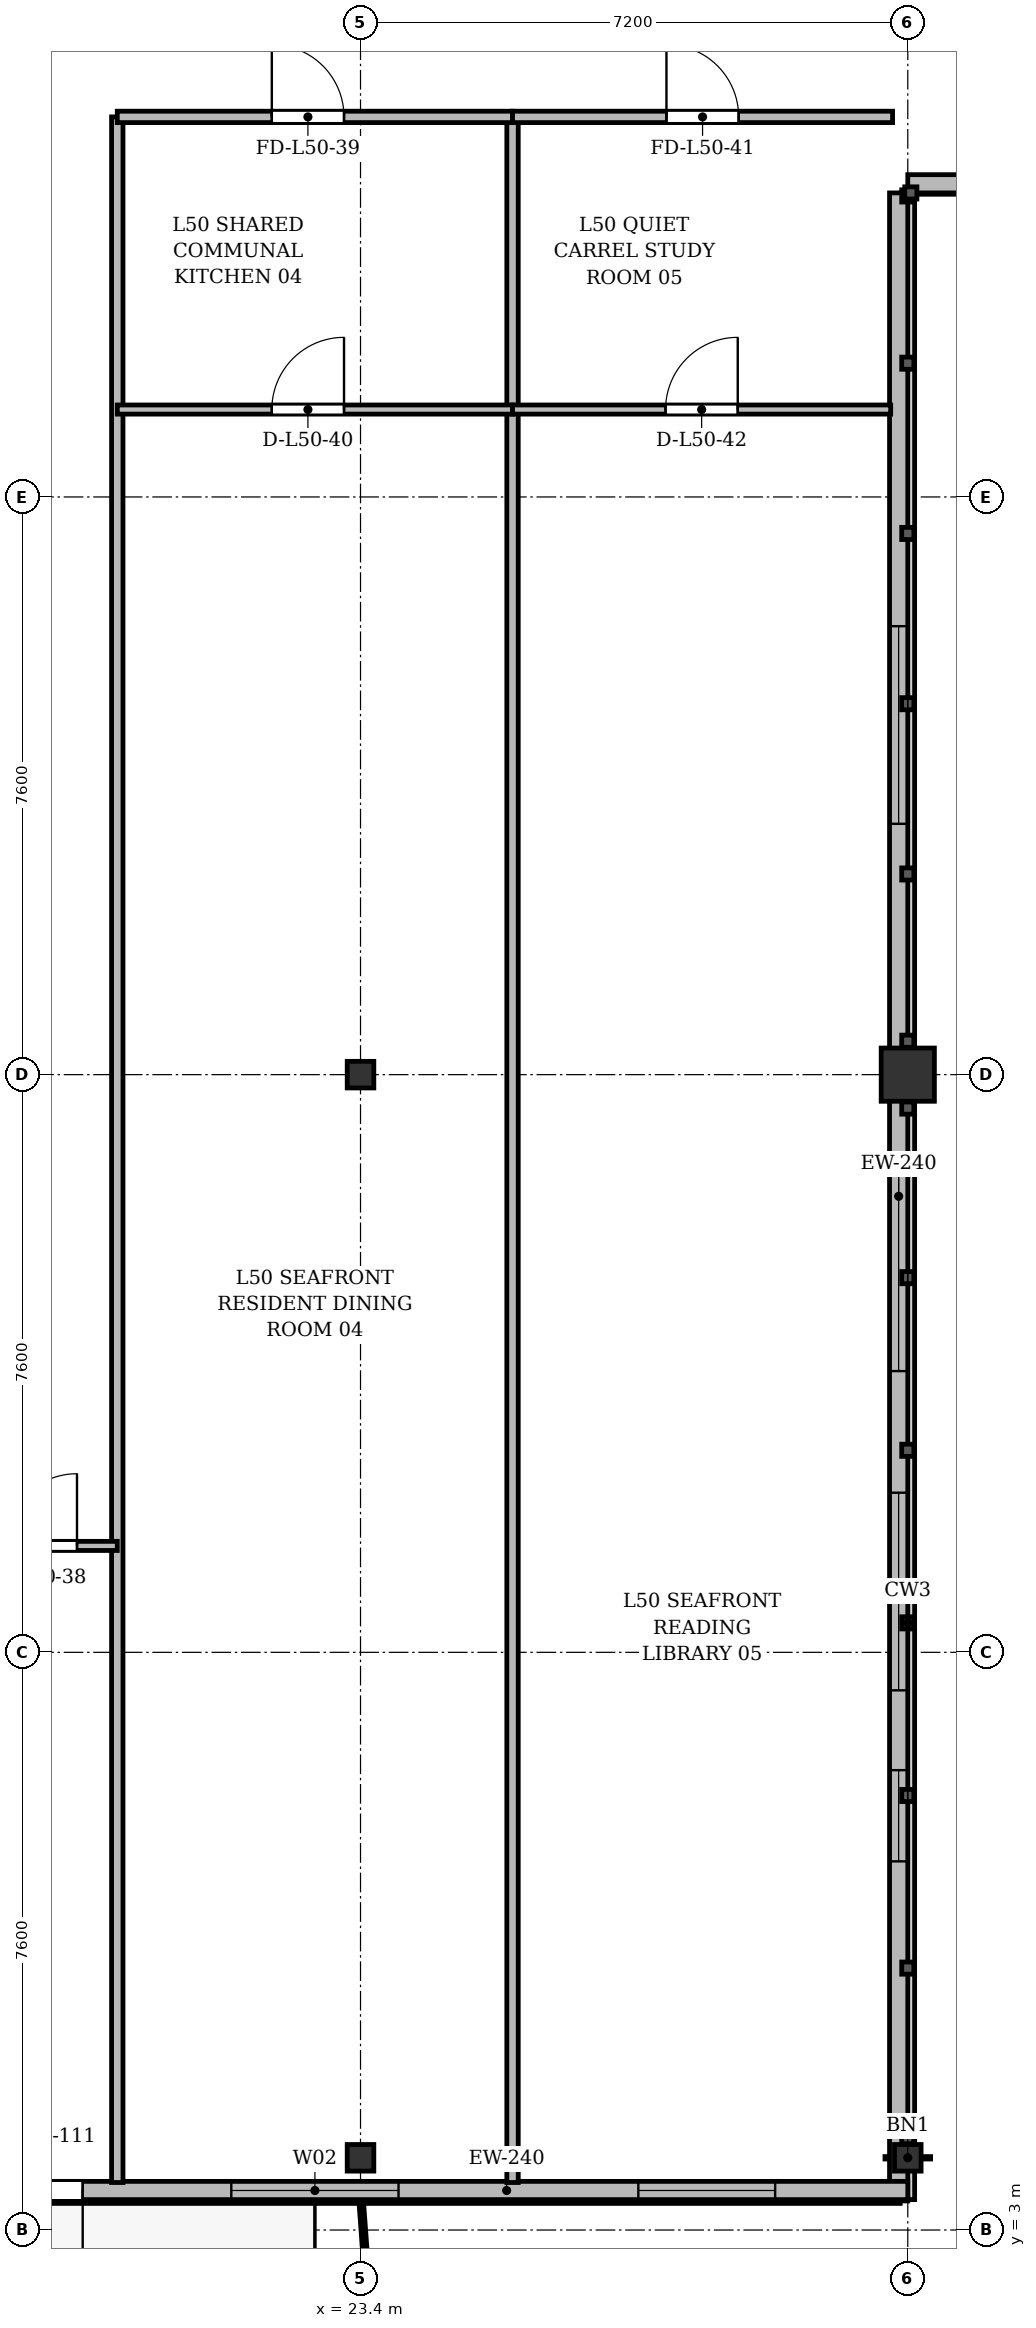
"""IFC4 building model, lengths in metres.
Left out: names, types, materials, properties, quantities, classifications, styles, units other than length and angle.
Written with IfcOpenShell. Run it as: python <this file> out.ifc"""

import sys

from ifc_helpers import new_model, si_unit, direction, frame, frame_2d, origin, origin_2d, place, context, subcontext, project, spatial, rectangle, i_section, extrude, source, transform, mapped, element, fill, save


model = new_model("IFC4")
c1 = context("Model", 3, precision=1e-05, world=origin(), true_north=direction((0.0, 1.0)))
c2 = subcontext(c1, "Body", "Model", "MODEL_VIEW")
j1 = project(units=[si_unit("LENGTHUNIT", "METRE"), si_unit("PLANEANGLEUNIT", "RADIAN")], contexts=[c1])
p1 = place(None, origin())
s1 = spatial("IfcSite", under=j1, at=p1, CompositionType="ELEMENT")
p2 = place(p1, origin())
s2 = spatial("IfcBuilding", under=s1, at=p2, CompositionType="ELEMENT")
p3 = place(p2, frame((0.0, 0.0, 194.1)))
s3 = spatial("IfcBuildingStorey", under=s2, at=p3, CompositionType="ELEMENT", Elevation=194.1)
m1 = source(origin(), c2, "Body", "SweptSolid", [
    extrude(i_section(OverallWidth=0.35, OverallDepth=0.35, WebThickness=0.018, FlangeThickness=0.028, at=origin_2d()), origin(), (0.0, 0.0, 1.0), 3.6),
])
for number, where, z_axis, x_axis in (
    (1, (23.4, 3.95, 0.0), (0.0, 0.0, 1.0), (1.0, 0.0, 0.0)),
    (2, (23.4, 18.2, 0.0), (0.0, 0.0, 1.0), (1.0, 0.0, 0.0)),
    (3, (30.6, 3.95, 0.0), (0.0, 0.0, 1.0), (1.0, 0.0, 0.0)),
):
    element("IfcColumn", number, at=place(p3, frame(where, z_axis=z_axis, x_axis=x_axis)), inside=s3, PredefinedType="COLUMN", context=c2, shape_type="MappedRepresentation", body=[
        mapped(m1, transform((0.0, 0.0, 0.0), x_axis=(1.0, 0.0, 0.0), y_axis=(0.0, 1.0, 0.0), z_axis=(0.0, 0.0, 1.0), scale=1.0)),
    ])
m2 = source(origin(), c2, "Body", "SweptSolid", [
    extrude(rectangle(XDim=0.7, YDim=0.7, at=origin_2d()), origin(), (0.0, 0.0, 1.0), 3.6),
])
p4 = place(p3, frame((30.6, 18.2, 0.0), z_axis=(0.0, 0.0, 1.0), x_axis=(1.0, 0.0, 0.0)))
e4 = element("IfcColumn", 4, at=p4, inside=s3, PredefinedType="COLUMN", context=c2, shape_type="MappedRepresentation", body=[
    mapped(m2, transform((0.0, 0.0, 0.0), x_axis=(1.0, 0.0, 0.0), y_axis=(0.0, 1.0, 0.0), z_axis=(0.0, 0.0, 1.0), scale=1.0)),
])
p5 = place(p3, frame((43.8, 29.92, 0.0), z_axis=(0.0, 0.0, 1.0), x_axis=(-1.0, 0.0, 0.0)))
e5 = element("IfcWall", 5, at=p5, inside=s3, PredefinedType="SOLIDWALL", context=c2, shape_type="SweptSolid", body=[
    extrude(rectangle(XDim=13.2, YDim=0.24, at=frame_2d((6.6, 0.0))), origin(), (0.0, 0.0, 1.0), 2.86),
])
p6 = place(p5, frame((5.7, 0.0, 0.9)))
e6 = element("IfcOpeningElement", 6, at=p6, cuts=e5, PredefinedType="OPENING", context=c2, shape_type="SweptSolid", body=[
    extrude(rectangle(XDim=1.8, YDim=1.8, at=frame_2d((0.9, 0.9))), frame((0.0, 0.13, 0.0), z_axis=(0.0, -1.0, 0.0), x_axis=(1.0, 0.0, 0.0)), (0.0, 0.0, 1.0), 0.26),
])
p7 = place(p3, frame((30.48, 29.8, 0.0), z_axis=(0.0, 0.0, 1.0), x_axis=(0.0, -1.0, 0.0)))
e7 = element("IfcWall", 7, at=p7, inside=s3, PredefinedType="SOLIDWALL", context=c2, shape_type="SweptSolid", body=[
    extrude(rectangle(XDim=26.4, YDim=0.24, at=frame_2d((13.2, 0.0))), origin(), (0.0, 0.0, 1.0), 2.86),
])
p8 = place(p7, frame((20.75, 0.0, 0.92)))
e8 = element("IfcOpeningElement", 8, at=p8, cuts=e7, PredefinedType="OPENING", context=c2, shape_type="SweptSolid", body=[
    extrude(rectangle(XDim=1.2, YDim=1.65, at=frame_2d((0.6, 0.825))), frame((0.0, 0.13, 0.0), z_axis=(0.0, -1.0, 0.0), x_axis=(1.0, 0.0, 0.0)), (0.0, 0.0, 1.0), 0.26),
])
p9 = place(p7, frame((17.1, 0.0, 0.92)))
e9 = element("IfcOpeningElement", 9, at=p9, cuts=e7, PredefinedType="OPENING", context=c2, shape_type="SweptSolid", body=[
    extrude(rectangle(XDim=2.6, YDim=1.84, at=frame_2d((1.3, 0.92))), frame((0.0, 0.13, 0.0), z_axis=(0.0, -1.0, 0.0), x_axis=(1.0, 0.0, 0.0)), (0.0, 0.0, 1.0), 0.26),
])
p10 = place(p7, frame((12.9, 0.0, 0.92)))
e10 = element("IfcOpeningElement", 10, at=p10, cuts=e7, PredefinedType="OPENING", context=c2, shape_type="SweptSolid", body=[
    extrude(rectangle(XDim=2.6, YDim=1.84, at=frame_2d((1.3, 0.92))), frame((0.0, 0.13, 0.0), z_axis=(0.0, -1.0, 0.0), x_axis=(1.0, 0.0, 0.0)), (0.0, 0.0, 1.0), 0.26),
])
p11 = place(p7, frame((5.7, 0.0, 0.92)))
e11 = element("IfcOpeningElement", 11, at=p11, cuts=e7, PredefinedType="OPENING", context=c2, shape_type="SweptSolid", body=[
    extrude(rectangle(XDim=2.6, YDim=1.84, at=frame_2d((1.3, 0.92))), frame((0.0, 0.13, 0.0), z_axis=(0.0, -1.0, 0.0), x_axis=(1.0, 0.0, 0.0)), (0.0, 0.0, 1.0), 0.26),
])
p12 = place(p3, frame((30.6, 3.52, 0.0), z_axis=(0.0, 0.0, 1.0), x_axis=(-1.0, 0.0, 0.0)))
e12 = element("IfcWall", 12, at=p12, inside=s3, PredefinedType="SOLIDWALL", context=c2, shape_type="SweptSolid", body=[
    extrude(rectangle(XDim=19.6, YDim=0.24, at=frame_2d((9.8, 0.0))), origin(), (0.0, 0.0, 1.0), 3.36),
])
p13 = place(p12, frame((1.745, 0.0, 0.9)))
e13 = element("IfcOpeningElement", 13, at=p13, cuts=e12, PredefinedType="OPENING", context=c2, shape_type="SweptSolid", body=[
    extrude(rectangle(XDim=1.8, YDim=1.8, at=frame_2d((0.9, 0.9))), frame((0.0, 0.13, 0.0), z_axis=(0.0, -1.0, 0.0), x_axis=(1.0, 0.0, 0.0)), (0.0, 0.0, 1.0), 0.26),
])
p14 = place(p12, frame((6.7, 0.0, 0.9)))
e14 = element("IfcOpeningElement", 14, at=p14, cuts=e12, PredefinedType="OPENING", context=c2, shape_type="SweptSolid", body=[
    extrude(rectangle(XDim=2.2, YDim=1.8, at=frame_2d((1.1, 0.9))), frame((0.0, 0.13, 0.0), z_axis=(0.0, -1.0, 0.0), x_axis=(1.0, 0.0, 0.0)), (0.0, 0.0, 1.0), 0.26),
])
p15 = place(p12, frame((10.855, 0.0, 0.0)))
e15 = element("IfcOpeningElement", 15, at=p15, cuts=e12, PredefinedType="OPENING", context=c2, shape_type="SweptSolid", body=[
    extrude(rectangle(XDim=1.2, YDim=2.2, at=frame_2d((0.6, 1.1))), frame((0.0, 0.13, 0.0), z_axis=(0.0, -1.0, 0.0), x_axis=(1.0, 0.0, 0.0)), (0.0, 0.0, 1.0), 0.26),
])
p16 = place(p12, frame((12.85, 0.0, 0.9)))
e16 = element("IfcOpeningElement", 16, at=p16, cuts=e12, PredefinedType="OPENING", context=c2, shape_type="SweptSolid", body=[
    extrude(rectangle(XDim=1.5, YDim=1.75, at=frame_2d((0.75, 0.875))), frame((0.0, 0.13, 0.0), z_axis=(0.0, -1.0, 0.0), x_axis=(1.0, 0.0, 0.0)), (0.0, 0.0, 1.0), 0.26),
])
p17 = place(p12, frame((15.175, 0.0, 0.9)))
e17 = element("IfcOpeningElement", 17, at=p17, cuts=e12, PredefinedType="OPENING", context=c2, shape_type="SweptSolid", body=[
    extrude(rectangle(XDim=1.65, YDim=1.85, at=frame_2d((0.825, 0.925))), frame((0.0, 0.13, 0.0), z_axis=(0.0, -1.0, 0.0), x_axis=(1.0, 0.0, 0.0)), (0.0, 0.0, 1.0), 0.26),
])
p18 = place(p12, frame((17.455, 0.0, 0.9)))
e18 = element("IfcOpeningElement", 18, at=p18, cuts=e12, PredefinedType="OPENING", context=c2, shape_type="SweptSolid", body=[
    extrude(rectangle(XDim=1.8, YDim=1.8, at=frame_2d((0.9, 0.9))), frame((0.0, 0.13, 0.0), z_axis=(0.0, -1.0, 0.0), x_axis=(1.0, 0.0, 0.0)), (0.0, 0.0, 1.0), 0.26),
])
for number, where, z_axis, x_axis in (
    (19, (25.4, 3.625, 0.0), (0.0, 0.0, 1.0), (0.0, 1.0, 0.0)),
    (20, (20.2, 3.625, 0.0), (0.0, 0.0, 1.0), (0.0, 1.0, 0.0)),
):
    element("IfcWall", number, at=place(p3, frame(where, z_axis=z_axis, x_axis=x_axis)), inside=s3, PredefinedType="PARTITIONING", context=c2, shape_type="SweptSolid", body=[
        extrude(rectangle(XDim=27.175, YDim=0.15, at=frame_2d((13.587, 0.0))), origin(), (0.0, 0.0, 1.0), 2.91),
    ])
p19 = place(p3, frame((18.2, 12.0, 0.0), z_axis=(0.0, 0.0, 1.0), x_axis=(1.0, 0.0, 0.0)))
e21 = element("IfcWall", 21, at=p19, inside=s3, PredefinedType="PARTITIONING", context=c2, shape_type="SweptSolid", body=[
    extrude(rectangle(XDim=2.0, YDim=0.12, at=frame_2d((1.0, 0.0))), origin(), (0.0, 0.0, 1.0), 3.36),
])
p20 = place(p19, frame((0.52, 0.0, 0.0)))
e22 = element("IfcOpeningElement", 22, at=p20, cuts=e21, PredefinedType="OPENING", context=c2, shape_type="SweptSolid", body=[
    extrude(rectangle(XDim=0.95, YDim=2.15, at=frame_2d((0.475, 1.075))), frame((0.0, 0.07, 0.0), z_axis=(0.0, -1.0, 0.0), x_axis=(1.0, 0.0, 0.0)), (0.0, 0.0, 1.0), 0.14),
])
p21 = place(p3, frame((20.2, 30.8, 0.0), z_axis=(0.0, 0.0, 1.0), x_axis=(1.0, 0.0, 0.0)))
e23 = element("IfcWall", 23, at=p21, inside=s3, PredefinedType="PARTITIONING", context=c2, shape_type="SweptSolid", body=[
    extrude(rectangle(XDim=5.2, YDim=0.15, at=frame_2d((2.6, 0.0))), origin(), (0.0, 0.0, 1.0), 2.86),
])
p22 = place(p21, frame((2.033, 0.0, 0.0)))
e24 = element("IfcOpeningElement", 24, at=p22, cuts=e23, PredefinedType="OPENING", context=c2, shape_type="SweptSolid", body=[
    extrude(rectangle(XDim=0.95, YDim=2.15, at=frame_2d((0.475, 1.075))), frame((0.0, 0.085, 0.0), z_axis=(0.0, -1.0, 0.0), x_axis=(1.0, 0.0, 0.0)), (0.0, 0.0, 1.0), 0.17),
])
p23 = place(p3, frame((20.2, 26.95, 0.0), z_axis=(0.0, 0.0, 1.0), x_axis=(1.0, 0.0, 0.0)))
e25 = element("IfcWall", 25, at=p23, inside=s3, PredefinedType="PARTITIONING", context=c2, shape_type="SweptSolid", body=[
    extrude(rectangle(XDim=5.2, YDim=0.12, at=frame_2d((2.6, 0.0))), origin(), (0.0, 0.0, 1.0), 2.86),
])
p24 = place(p23, frame((2.033, 0.0, 0.0)))
e26 = element("IfcOpeningElement", 26, at=p24, cuts=e25, PredefinedType="OPENING", context=c2, shape_type="SweptSolid", body=[
    extrude(rectangle(XDim=0.95, YDim=2.15, at=frame_2d((0.475, 1.075))), frame((0.0, 0.07, 0.0), z_axis=(0.0, -1.0, 0.0), x_axis=(1.0, 0.0, 0.0)), (0.0, 0.0, 1.0), 0.14),
])
p25 = place(p3, frame((25.4, 30.8, 0.0), z_axis=(0.0, 0.0, 1.0), x_axis=(1.0, 0.0, 0.0)))
e27 = element("IfcWall", 27, at=p25, inside=s3, PredefinedType="PARTITIONING", context=c2, shape_type="SweptSolid", body=[
    extrude(rectangle(XDim=5.0, YDim=0.15, at=frame_2d((2.5, 0.0))), origin(), (0.0, 0.0, 1.0), 3.36),
])
p26 = place(p25, frame((2.025, 0.0, 0.0)))
e28 = element("IfcOpeningElement", 28, at=p26, cuts=e27, PredefinedType="OPENING", context=c2, shape_type="SweptSolid", body=[
    extrude(rectangle(XDim=0.95, YDim=2.15, at=frame_2d((0.475, 1.075))), frame((0.0, 0.085, 0.0), z_axis=(0.0, -1.0, 0.0), x_axis=(1.0, 0.0, 0.0)), (0.0, 0.0, 1.0), 0.17),
])
p27 = place(p3, frame((25.4, 26.95, 0.0), z_axis=(0.0, 0.0, 1.0), x_axis=(1.0, 0.0, 0.0)))
e29 = element("IfcWall", 29, at=p27, inside=s3, PredefinedType="PARTITIONING", context=c2, shape_type="SweptSolid", body=[
    extrude(rectangle(XDim=4.975, YDim=0.12, at=frame_2d((2.488, 0.0))), origin(), (0.0, 0.0, 1.0), 3.36),
])
p28 = place(p27, frame((2.013, 0.0, 0.0)))
e30 = element("IfcOpeningElement", 30, at=p28, cuts=e29, PredefinedType="OPENING", context=c2, shape_type="SweptSolid", body=[
    extrude(rectangle(XDim=0.95, YDim=2.15, at=frame_2d((0.475, 1.075))), frame((0.0, 0.07, 0.0), z_axis=(0.0, -1.0, 0.0), x_axis=(1.0, 0.0, 0.0)), (0.0, 0.0, 1.0), 0.14),
])
m3 = source(origin(), c2, "Body", "SweptSolid", [
    extrude(rectangle(XDim=1.2, YDim=1.65, at=frame_2d((0.6, 0.825))), frame((0.0, 0.03, 0.0), z_axis=(0.0, -1.0, 0.0), x_axis=(1.0, 0.0, 0.0)), (0.0, 0.0, 1.0), 0.06),
])
p29 = place(p8, origin())
e31 = element("IfcWindow", 31, at=p29, inside=s3, PartitioningType="SINGLE_PANEL", PredefinedType="WINDOW", context=c2, shape_type="MappedRepresentation", body=[
    mapped(m3, transform((0.0, 0.0, 0.0), x_axis=(1.0, 0.0, 0.0), y_axis=(0.0, 1.0, 0.0), z_axis=(0.0, 0.0, 1.0), scale=1.0)),
])
fill(e8, e31)
m4 = source(origin(), c2, "Body", "SweptSolid", [
    extrude(rectangle(XDim=2.6, YDim=1.84, at=frame_2d((1.3, 0.92))), frame((0.0, 0.03, 0.0), z_axis=(0.0, -1.0, 0.0), x_axis=(1.0, 0.0, 0.0)), (0.0, 0.0, 1.0), 0.06),
])
p30 = place(p9, origin())
e32 = element("IfcWindow", 32, at=p30, inside=s3, PartitioningType="SINGLE_PANEL", PredefinedType="WINDOW", context=c2, shape_type="MappedRepresentation", body=[
    mapped(m4, transform((0.0, 0.0, 0.0), x_axis=(1.0, 0.0, 0.0), y_axis=(0.0, 1.0, 0.0), z_axis=(0.0, 0.0, 1.0), scale=1.0)),
])
fill(e9, e32)
p31 = place(p10, origin())
e33 = element("IfcWindow", 33, at=p31, inside=s3, PartitioningType="SINGLE_PANEL", PredefinedType="WINDOW", context=c2, shape_type="MappedRepresentation", body=[
    mapped(m4, transform((0.0, 0.0, 0.0), x_axis=(1.0, 0.0, 0.0), y_axis=(0.0, 1.0, 0.0), z_axis=(0.0, 0.0, 1.0), scale=1.0)),
])
fill(e10, e33)
p32 = place(p11, origin())
e34 = element("IfcWindow", 34, at=p32, inside=s3, PartitioningType="SINGLE_PANEL", PredefinedType="WINDOW", context=c2, shape_type="MappedRepresentation", body=[
    mapped(m4, transform((0.0, 0.0, 0.0), x_axis=(1.0, 0.0, 0.0), y_axis=(0.0, 1.0, 0.0), z_axis=(0.0, 0.0, 1.0), scale=1.0)),
])
fill(e11, e34)
m5 = source(origin(), c2, "Body", "SweptSolid", [
    extrude(rectangle(XDim=1.8, YDim=1.8, at=frame_2d((0.9, 0.9))), frame((0.0, 0.03, 0.0), z_axis=(0.0, -1.0, 0.0), x_axis=(1.0, 0.0, 0.0)), (0.0, 0.0, 1.0), 0.06),
])
p33 = place(p13, origin())
e35 = element("IfcWindow", 35, at=p33, inside=s3, PartitioningType="SINGLE_PANEL", PredefinedType="WINDOW", context=c2, shape_type="MappedRepresentation", body=[
    mapped(m5, transform((0.0, 0.0, 0.0), x_axis=(1.0, 0.0, 0.0), y_axis=(0.0, 1.0, 0.0), z_axis=(0.0, 0.0, 1.0), scale=1.0)),
])
fill(e13, e35)
m6 = source(origin(), c2, "Body", "SweptSolid", [
    extrude(rectangle(XDim=2.2, YDim=1.8, at=frame_2d((1.1, 0.9))), frame((0.0, 0.03, 0.0), z_axis=(0.0, -1.0, 0.0), x_axis=(1.0, 0.0, 0.0)), (0.0, 0.0, 1.0), 0.06),
])
p34 = place(p14, origin())
e36 = element("IfcWindow", 36, at=p34, inside=s3, PartitioningType="SINGLE_PANEL", PredefinedType="WINDOW", context=c2, shape_type="MappedRepresentation", body=[
    mapped(m6, transform((0.0, 0.0, 0.0), x_axis=(1.0, 0.0, 0.0), y_axis=(0.0, 1.0, 0.0), z_axis=(0.0, 0.0, 1.0), scale=1.0)),
])
fill(e14, e36)
m7 = source(origin(), c2, "Body", "SweptSolid", [
    extrude(rectangle(XDim=1.2, YDim=2.2, at=frame_2d((0.6, 1.1))), frame((0.0, 0.025, 0.0), z_axis=(0.0, -1.0, 0.0), x_axis=(1.0, 0.0, 0.0)), (0.0, 0.0, 1.0), 0.05),
])
p35 = place(p15, origin())
e37 = element("IfcDoor", 37, at=p35, inside=s3, OperationType="SINGLE_SWING_LEFT", PredefinedType="DOOR", context=c2, shape_type="MappedRepresentation", body=[
    mapped(m7, transform((0.0, 0.0, 0.0), x_axis=(1.0, 0.0, 0.0), y_axis=(0.0, 1.0, 0.0), z_axis=(0.0, 0.0, 1.0), scale=1.0)),
])
fill(e15, e37)
m8 = source(origin(), c2, "Body", "SweptSolid", [
    extrude(rectangle(XDim=0.95, YDim=2.15, at=frame_2d((0.475, 1.075))), frame((0.0, 0.025, 0.0), z_axis=(0.0, -1.0, 0.0), x_axis=(1.0, 0.0, 0.0)), (0.0, 0.0, 1.0), 0.05),
])
p36 = place(p20, origin())
e38 = element("IfcDoor", 38, at=p36, inside=s3, OperationType="SINGLE_SWING_RIGHT", PredefinedType="DOOR", context=c2, shape_type="MappedRepresentation", body=[
    mapped(m8, transform((0.0, 0.0, 0.0), x_axis=(1.0, 0.0, 0.0), y_axis=(0.0, 1.0, 0.0), z_axis=(0.0, 0.0, 1.0), scale=1.0)),
])
fill(e22, e38)
p37 = place(p22, origin())
e39 = element("IfcDoor", 39, at=p37, inside=s3, OperationType="SINGLE_SWING_LEFT", PredefinedType="DOOR", context=c2, shape_type="MappedRepresentation", body=[
    mapped(m8, transform((0.0, 0.0, 0.0), x_axis=(1.0, 0.0, 0.0), y_axis=(0.0, 1.0, 0.0), z_axis=(0.0, 0.0, 1.0), scale=1.0)),
])
fill(e24, e39)
p38 = place(p24, origin())
e40 = element("IfcDoor", 40, at=p38, inside=s3, OperationType="SINGLE_SWING_RIGHT", PredefinedType="DOOR", context=c2, shape_type="MappedRepresentation", body=[
    mapped(m8, transform((0.0, 0.0, 0.0), x_axis=(1.0, 0.0, 0.0), y_axis=(0.0, 1.0, 0.0), z_axis=(0.0, 0.0, 1.0), scale=1.0)),
])
fill(e26, e40)
p39 = place(p26, origin())
e41 = element("IfcDoor", 41, at=p39, inside=s3, OperationType="SINGLE_SWING_LEFT", PredefinedType="DOOR", context=c2, shape_type="MappedRepresentation", body=[
    mapped(m8, transform((0.0, 0.0, 0.0), x_axis=(1.0, 0.0, 0.0), y_axis=(0.0, 1.0, 0.0), z_axis=(0.0, 0.0, 1.0), scale=1.0)),
])
fill(e28, e41)
p40 = place(p28, origin())
e42 = element("IfcDoor", 42, at=p40, inside=s3, OperationType="SINGLE_SWING_RIGHT", PredefinedType="DOOR", context=c2, shape_type="MappedRepresentation", body=[
    mapped(m8, transform((0.0, 0.0, 0.0), x_axis=(1.0, 0.0, 0.0), y_axis=(0.0, 1.0, 0.0), z_axis=(0.0, 0.0, 1.0), scale=1.0)),
])
fill(e30, e42)
save(model, sys.argv[1])
